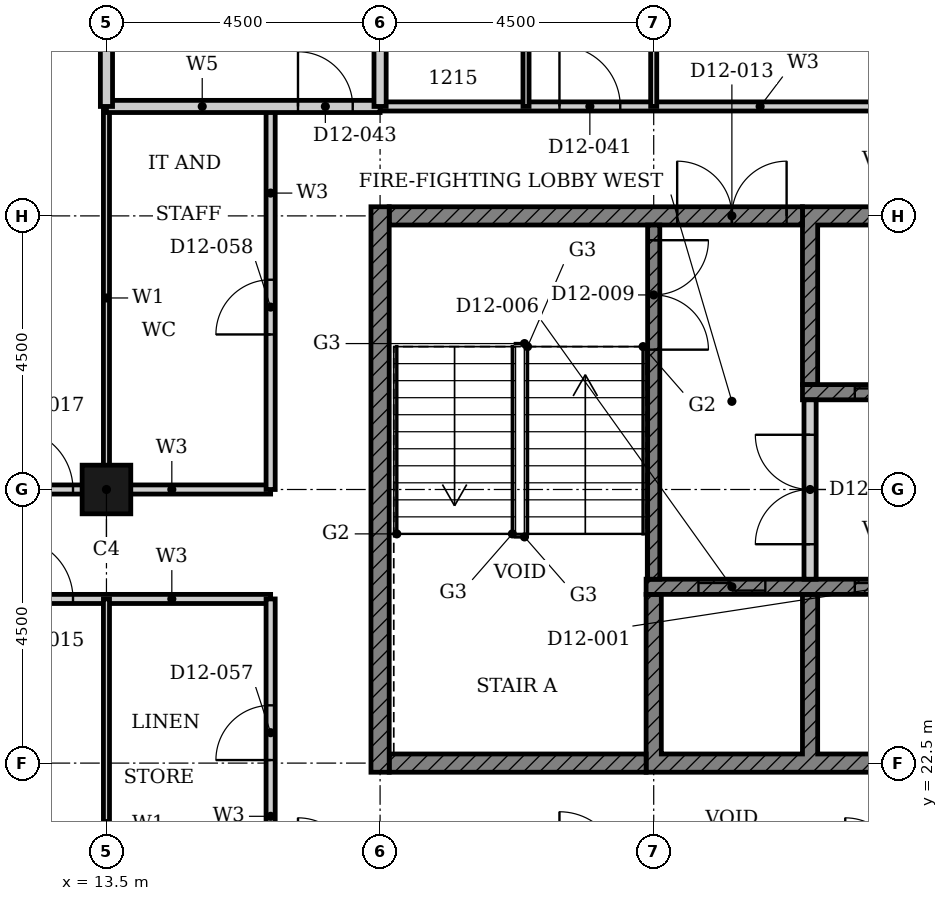
"""IFC4 building model, lengths in metres.
Left out: names, types, materials, properties, quantities, classifications, styles, units other than length and angle.
Written with IfcOpenShell. Run it as: python <this file> out.ifc"""

import sys

from ifc_helpers import new_model, si_unit, direction, frame, frame_2d, origin, origin_2d, place, context, subcontext, project, spatial, polyline, rectangle, hollow_rectangle, outline, extrude, element, fill, save


model = new_model("IFC4")
c1 = context("Model", 3, precision=1e-05, world=origin(), true_north=direction((0.0, 1.0)))
c2 = subcontext(c1, "Body", "Model", "MODEL_VIEW")
j1 = project(units=[si_unit("LENGTHUNIT", "METRE"), si_unit("PLANEANGLEUNIT", "RADIAN")], contexts=[c1])
p1 = place(None, origin())
s1 = spatial("IfcSite", under=j1, at=p1, CompositionType="ELEMENT")
p2 = place(p1, origin())
s2 = spatial("IfcBuilding", under=s1, at=p2, CompositionType="ELEMENT")
p3 = place(p2, frame((0.0, 0.0, 56.4)))
s3 = spatial("IfcBuildingStorey", under=s2, at=p3, CompositionType="ELEMENT", Elevation=56.4)
p4 = place(p3, frame((13.5, 27.0, 0.0), z_axis=(0.0, 0.0, 1.0), x_axis=(1.0, 0.0, 0.0)))
e1 = element("IfcColumn", 1, at=p4, inside=s3, PredefinedType="COLUMN", context=c2, shape_type="SweptSolid", body=[
    extrude(hollow_rectangle(XDim=0.8, YDim=0.8, WallThickness=0.025, at=origin_2d()), origin(), (0.0, 0.0, 1.0), 3.6),
])
p5 = place(p3, origin())
e2 = element("IfcWall", 2, at=p5, inside=s3, PredefinedType="SHEAR", context=c2, shape_type="SweptSolid", body=[
    extrude(outline(polyline([(22.375, 22.35), (38.053, 22.35), (38.053, 25.275), (37.803, 25.275), (37.803, 22.65), (35.482, 22.65), (35.482, 25.275), (35.232, 25.275), (35.232, 22.65), (32.911, 22.65), (32.911, 25.275), (32.661, 25.275), (32.661, 22.65), (30.339, 22.65), (30.339, 25.275), (30.089, 25.275), (30.089, 22.65), (27.768, 22.65), (27.768, 25.275), (27.518, 25.275), (27.518, 22.65), (25.197, 22.65), (25.197, 25.275), (24.947, 25.275), (24.947, 22.65), (22.625, 22.65), (22.625, 25.275), (22.375, 25.275), (22.375, 22.35)])), origin(), (0.0, 0.0, 1.0), 3.3),
])
p6 = place(p3, origin())
e3 = element("IfcWall", 3, at=p6, inside=s3, PredefinedType="SHEAR", context=c2, shape_type="SweptSolid", body=[
    extrude(outline(polyline([(24.947, 28.725), (25.197, 28.725), (25.197, 31.35), (27.518, 31.35), (27.518, 28.725), (27.768, 28.725), (27.768, 31.35), (30.089, 31.35), (30.089, 28.725), (30.339, 28.725), (30.339, 31.35), (32.661, 31.35), (32.661, 28.725), (32.911, 28.725), (32.911, 31.35), (35.232, 31.35), (35.232, 28.725), (35.482, 28.725), (35.482, 31.35), (37.803, 31.35), (37.803, 28.725), (38.053, 28.725), (38.053, 31.35), (40.375, 31.35), (40.375, 28.725), (40.625, 28.725), (40.625, 31.65), (24.947, 31.65), (24.947, 28.725)])), origin(), (0.0, 0.0, 1.0), 3.3),
])
p7 = place(p3, frame((18.15, 22.5, 0.0), z_axis=(0.0, 0.0, 1.0), x_axis=(1.0, 0.0, 0.0)))
e4 = element("IfcWall", 4, at=p7, inside=s3, PredefinedType="SHEAR", context=c2, shape_type="SweptSolid", body=[
    extrude(rectangle(XDim=4.225, YDim=0.3, at=frame_2d((2.113, 0.0))), origin(), (0.0, 0.0, 1.0), 3.3),
])
p8 = place(p3, frame((18.15, 31.5, 0.0), z_axis=(0.0, 0.0, 1.0), x_axis=(1.0, 0.0, 0.0)))
e5 = element("IfcWall", 5, at=p8, inside=s3, PredefinedType="SHEAR", context=c2, shape_type="SweptSolid", body=[
    extrude(rectangle(XDim=6.797, YDim=0.3, at=frame_2d((3.398, 0.0))), origin(), (0.0, 0.0, 1.0), 3.3),
])
p9 = place(p8, frame((4.736, 0.0, 0.0)))
e6 = element("IfcOpeningElement", 6, at=p9, cuts=e5, PredefinedType="OPENING", context=c2, shape_type="SweptSolid", body=[
    extrude(rectangle(XDim=1.8, YDim=2.1, at=frame_2d((0.9, 1.05))), frame((0.0, 0.16, 0.0), z_axis=(0.0, -1.0, 0.0), x_axis=(1.0, 0.0, 0.0)), (0.0, 0.0, 1.0), 0.32),
])
p10 = place(p3, frame((18.0, 22.35, 0.0), z_axis=(0.0, 0.0, 1.0), x_axis=(0.0, 1.0, 0.0)))
e7 = element("IfcWall", 7, at=p10, inside=s3, PredefinedType="SHEAR", context=c2, shape_type="SweptSolid", body=[
    extrude(rectangle(XDim=9.3, YDim=0.3, at=frame_2d((4.65, 0.0))), origin(), (0.0, 0.0, 1.0), 3.3),
])
p11 = place(p3, frame((22.375, 25.4, 0.0), z_axis=(0.0, 0.0, 1.0), x_axis=(1.0, 0.0, 0.0)))
e8 = element("IfcWall", 8, at=p11, inside=s3, PredefinedType="SHEAR", context=c2, shape_type="SweptSolid", body=[
    extrude(rectangle(XDim=15.678, YDim=0.25, at=frame_2d((7.839, 0.0))), origin(), (0.0, 0.0, 1.0), 3.3),
])
p12 = place(p11, frame((3.432, 0.0, 0.0)))
e9 = element("IfcOpeningElement", 9, at=p12, cuts=e8, PredefinedType="OPENING", context=c2, shape_type="SweptSolid", body=[
    extrude(rectangle(XDim=1.1, YDim=2.1, at=frame_2d((0.55, 1.05))), frame((0.0, 0.135, 0.0), z_axis=(0.0, -1.0, 0.0), x_axis=(1.0, 0.0, 0.0)), (0.0, 0.0, 1.0), 0.27),
])
p13 = place(p11, frame((11.146, 0.0, 0.0)))
e10 = element("IfcOpeningElement", 10, at=p13, cuts=e8, PredefinedType="OPENING", context=c2, shape_type="SweptSolid", body=[
    extrude(rectangle(XDim=1.1, YDim=2.1, at=frame_2d((0.55, 1.05))), frame((0.0, 0.135, 0.0), z_axis=(0.0, -1.0, 0.0), x_axis=(1.0, 0.0, 0.0)), (0.0, 0.0, 1.0), 0.27),
])
p14 = place(p11, frame((13.718, 0.0, 0.0)))
e11 = element("IfcOpeningElement", 11, at=p14, cuts=e8, PredefinedType="OPENING", context=c2, shape_type="SweptSolid", body=[
    extrude(rectangle(XDim=1.1, YDim=2.1, at=frame_2d((0.55, 1.05))), frame((0.0, 0.135, 0.0), z_axis=(0.0, -1.0, 0.0), x_axis=(1.0, 0.0, 0.0)), (0.0, 0.0, 1.0), 0.27),
])
p15 = place(p11, frame((0.861, 0.0, 0.0)))
e12 = element("IfcOpeningElement", 12, at=p15, cuts=e8, PredefinedType="OPENING", context=c2, shape_type="SweptSolid", body=[
    extrude(rectangle(XDim=1.1, YDim=2.1, at=frame_2d((0.55, 1.05))), frame((0.0, 0.135, 0.0), z_axis=(0.0, -1.0, 0.0), x_axis=(1.0, 0.0, 0.0)), (0.0, 0.0, 1.0), 0.27),
])
p16 = place(p3, frame((24.947, 28.6, 0.0), z_axis=(0.0, 0.0, 1.0), x_axis=(1.0, 0.0, 0.0)))
e13 = element("IfcWall", 13, at=p16, inside=s3, PredefinedType="SHEAR", context=c2, shape_type="SweptSolid", body=[
    extrude(rectangle(XDim=15.678, YDim=0.25, at=frame_2d((7.839, 0.0))), origin(), (0.0, 0.0, 1.0), 3.3),
])
p17 = place(p16, frame((0.861, 0.0, 0.0)))
e14 = element("IfcOpeningElement", 14, at=p17, cuts=e13, PredefinedType="OPENING", context=c2, shape_type="SweptSolid", body=[
    extrude(rectangle(XDim=1.1, YDim=2.1, at=frame_2d((0.55, 1.05))), frame((0.0, 0.135, 0.0), z_axis=(0.0, -1.0, 0.0), x_axis=(1.0, 0.0, 0.0)), (0.0, 0.0, 1.0), 0.27),
])
p18 = place(p16, frame((8.575, 0.0, 0.0)))
e15 = element("IfcOpeningElement", 15, at=p18, cuts=e13, PredefinedType="OPENING", context=c2, shape_type="SweptSolid", body=[
    extrude(rectangle(XDim=1.1, YDim=2.1, at=frame_2d((0.55, 1.05))), frame((0.0, 0.135, 0.0), z_axis=(0.0, -1.0, 0.0), x_axis=(1.0, 0.0, 0.0)), (0.0, 0.0, 1.0), 0.27),
])
p19 = place(p16, frame((13.718, 0.0, 0.0)))
e16 = element("IfcOpeningElement", 16, at=p19, cuts=e13, PredefinedType="OPENING", context=c2, shape_type="SweptSolid", body=[
    extrude(rectangle(XDim=1.1, YDim=2.1, at=frame_2d((0.55, 1.05))), frame((0.0, 0.135, 0.0), z_axis=(0.0, -1.0, 0.0), x_axis=(1.0, 0.0, 0.0)), (0.0, 0.0, 1.0), 0.27),
])
p20 = place(p3, frame((22.5, 31.35, 0.0), z_axis=(0.0, 0.0, 1.0), x_axis=(0.0, -1.0, 0.0)))
e17 = element("IfcWall", 17, at=p20, inside=s3, PredefinedType="SHEAR", context=c2, shape_type="SweptSolid", body=[
    extrude(rectangle(XDim=5.825, YDim=0.2, at=frame_2d((2.913, 0.0))), origin(), (0.0, 0.0, 1.0), 3.3),
])
p21 = place(p20, frame((0.25, 0.0, 0.0)))
e18 = element("IfcOpeningElement", 18, at=p21, cuts=e17, PredefinedType="OPENING", context=c2, shape_type="SweptSolid", body=[
    extrude(rectangle(XDim=1.8, YDim=2.1, at=frame_2d((0.9, 1.05))), frame((0.0, 0.11, 0.0), z_axis=(0.0, -1.0, 0.0), x_axis=(1.0, 0.0, 0.0)), (0.0, 0.0, 1.0), 0.22),
])
p22 = place(p3, frame((25.072, 25.525, 0.0), z_axis=(0.0, 0.0, 1.0), x_axis=(0.0, 1.0, 0.0)))
e19 = element("IfcWall", 19, at=p22, inside=s3, PredefinedType="PARTITIONING", context=c2, shape_type="SweptSolid", body=[
    extrude(rectangle(XDim=2.95, YDim=0.2, at=frame_2d((1.475, 0.0))), origin(), (0.0, 0.0, 1.0), 3.3),
])
p23 = place(p22, frame((0.575, 0.0, 0.0)))
e20 = element("IfcOpeningElement", 20, at=p23, cuts=e19, PredefinedType="OPENING", context=c2, shape_type="SweptSolid", body=[
    extrude(rectangle(XDim=1.8, YDim=2.1, at=frame_2d((0.9, 1.05))), frame((0.0, 0.11, 0.0), z_axis=(0.0, -1.0, 0.0), x_axis=(1.0, 0.0, 0.0)), (0.0, 0.0, 1.0), 0.22),
])
p24 = place(p3, frame((9.0, 25.2, 0.0), z_axis=(0.0, 0.0, 1.0), x_axis=(1.0, 0.0, 0.0)))
e21 = element("IfcWall", 21, at=p24, inside=s3, PredefinedType="PARTITIONING", context=c2, shape_type="SweptSolid", body=[
    extrude(rectangle(XDim=7.2, YDim=0.15, at=frame_2d((3.6, 0.0))), origin(), (0.0, 0.0, 1.0), 3.3),
])
p25 = place(p24, frame((2.95, 0.0, 0.0)))
e22 = element("IfcOpeningElement", 22, at=p25, cuts=e21, PredefinedType="OPENING", context=c2, shape_type="SweptSolid", body=[
    extrude(rectangle(XDim=1.0, YDim=2.1, at=frame_2d((0.5, 1.05))), frame((0.0, 0.085, 0.0), z_axis=(0.0, -1.0, 0.0), x_axis=(1.0, 0.0, 0.0)), (0.0, 0.0, 1.0), 0.17),
])
p26 = place(p3, frame((9.0, 27.0, 0.0), z_axis=(0.0, 0.0, 1.0), x_axis=(1.0, 0.0, 0.0)))
e23 = element("IfcWall", 23, at=p26, inside=s3, PredefinedType="PARTITIONING", context=c2, shape_type="SweptSolid", body=[
    extrude(rectangle(XDim=7.2, YDim=0.15, at=frame_2d((3.6, 0.0))), origin(), (0.0, 0.0, 1.0), 2.58),
])
p27 = place(p26, frame((2.95, 0.0, 0.0)))
e24 = element("IfcOpeningElement", 24, at=p27, cuts=e23, PredefinedType="OPENING", context=c2, shape_type="SweptSolid", body=[
    extrude(rectangle(XDim=1.0, YDim=2.1, at=frame_2d((0.5, 1.05))), frame((0.0, 0.085, 0.0), z_axis=(0.0, -1.0, 0.0), x_axis=(1.0, 0.0, 0.0)), (0.0, 0.0, 1.0), 0.17),
])
p28 = place(p3, frame((18.0, 33.3, 0.0), z_axis=(0.0, 0.0, 1.0), x_axis=(1.0, 0.0, 0.0)))
e25 = element("IfcWall", 25, at=p28, inside=s3, PredefinedType="PARTITIONING", context=c2, shape_type="SweptSolid", body=[
    extrude(rectangle(XDim=13.5, YDim=0.15, at=frame_2d((6.75, 0.0))), origin(), (0.0, 0.0, 1.0), 3.3),
])
p29 = place(p28, frame((2.95, 0.0, 0.0)))
e26 = element("IfcOpeningElement", 26, at=p29, cuts=e25, PredefinedType="OPENING", context=c2, shape_type="SweptSolid", body=[
    extrude(rectangle(XDim=1.0, YDim=2.1, at=frame_2d((0.5, 1.05))), frame((0.0, 0.085, 0.0), z_axis=(0.0, -1.0, 0.0), x_axis=(1.0, 0.0, 0.0)), (0.0, 0.0, 1.0), 0.17),
])
p30 = place(p28, frame((8.55, 0.0, 0.0)))
e27 = element("IfcOpeningElement", 27, at=p30, cuts=e25, PredefinedType="OPENING", context=c2, shape_type="SweptSolid", body=[
    extrude(rectangle(XDim=0.9, YDim=2.1, at=frame_2d((0.45, 1.05))), frame((0.0, 0.085, 0.0), z_axis=(0.0, -1.0, 0.0), x_axis=(1.0, 0.0, 0.0)), (0.0, 0.0, 1.0), 0.17),
])
p31 = place(p3, frame((16.2, 27.0, 0.0), z_axis=(0.0, 0.0, 1.0), x_axis=(0.0, 1.0, 0.0)))
e28 = element("IfcWall", 28, at=p31, inside=s3, PredefinedType="PARTITIONING", context=c2, shape_type="SweptSolid", body=[
    extrude(rectangle(XDim=6.3, YDim=0.15, at=frame_2d((3.15, 0.0))), origin(), (0.0, 0.0, 1.0), 3.3),
])
p32 = place(p31, frame((2.55, 0.0, 0.0)))
e29 = element("IfcOpeningElement", 29, at=p32, cuts=e28, PredefinedType="OPENING", context=c2, shape_type="SweptSolid", body=[
    extrude(rectangle(XDim=0.9, YDim=2.1, at=frame_2d((0.45, 1.05))), frame((0.0, 0.085, 0.0), z_axis=(0.0, -1.0, 0.0), x_axis=(1.0, 0.0, 0.0)), (0.0, 0.0, 1.0), 0.17),
])
p33 = place(p3, frame((16.2, 20.7, 0.0), z_axis=(0.0, 0.0, 1.0), x_axis=(0.0, 1.0, 0.0)))
e30 = element("IfcWall", 30, at=p33, inside=s3, PredefinedType="PARTITIONING", context=c2, shape_type="SweptSolid", body=[
    extrude(rectangle(XDim=4.5, YDim=0.15, at=frame_2d((2.25, 0.0))), origin(), (0.0, 0.0, 1.0), 3.3),
])
p34 = place(p33, frame((1.85, 0.0, 0.0)))
e31 = element("IfcOpeningElement", 31, at=p34, cuts=e30, PredefinedType="OPENING", context=c2, shape_type="SweptSolid", body=[
    extrude(rectangle(XDim=0.9, YDim=2.1, at=frame_2d((0.45, 1.05))), frame((0.0, 0.085, 0.0), z_axis=(0.0, -1.0, 0.0), x_axis=(1.0, 0.0, 0.0)), (0.0, 0.0, 1.0), 0.17),
])
p35 = place(p3, frame((13.5, 27.0, 0.0), z_axis=(0.0, 0.0, 1.0), x_axis=(0.0, 1.0, 0.0)))
e32 = element("IfcWall", 32, at=p35, inside=s3, PredefinedType="PARTITIONING", context=c2, shape_type="SweptSolid", body=[
    extrude(rectangle(XDim=6.3, YDim=0.1, at=frame_2d((3.15, 0.0))), origin(), (0.0, 0.0, 1.0), 2.38),
])
p36 = place(p3, frame((13.5, 17.81, 0.0), z_axis=(0.0, 0.0, 1.0), x_axis=(0.0, 1.0, 0.0)))
e33 = element("IfcWall", 33, at=p36, inside=s3, PredefinedType="PARTITIONING", context=c2, shape_type="SweptSolid", body=[
    extrude(rectangle(XDim=7.39, YDim=0.1, at=frame_2d((3.695, 0.0))), origin(), (0.0, 0.0, 1.0), 2.38),
])
p37 = place(p3, frame((22.5, 33.3, 0.0), z_axis=(0.0, 0.0, 1.0), x_axis=(0.0, 1.0, 0.0)))
e34 = element("IfcWall", 34, at=p37, inside=s3, PredefinedType="PARTITIONING", context=c2, shape_type="SweptSolid", body=[
    extrude(rectangle(XDim=7.39, YDim=0.1, at=frame_2d((3.695, 0.0))), origin(), (0.0, 0.0, 1.0), 3.3),
])
p38 = place(p3, frame((20.4, 33.3, 0.0), z_axis=(0.0, 0.0, 1.0), x_axis=(0.0, 1.0, 0.0)))
e35 = element("IfcWall", 35, at=p38, inside=s3, PredefinedType="PARTITIONING", context=c2, shape_type="SweptSolid", body=[
    extrude(rectangle(XDim=2.7, YDim=0.1, at=frame_2d((1.35, 0.0))), origin(), (0.0, 0.0, 1.0), 3.3),
])
p39 = place(p3, frame((13.5, 33.3, 0.0), z_axis=(0.0, 0.0, 1.0), x_axis=(1.0, 0.0, 0.0)))
e36 = element("IfcWall", 36, at=p39, inside=s3, PredefinedType="PARTITIONING", context=c2, shape_type="SweptSolid", body=[
    extrude(rectangle(XDim=4.5, YDim=0.2, at=frame_2d((2.25, 0.0))), origin(), (0.0, 0.0, 1.0), 3.3),
])
p40 = place(p39, frame((3.15, 0.0, 0.0)))
e37 = element("IfcOpeningElement", 37, at=p40, cuts=e36, PredefinedType="OPENING", context=c2, shape_type="SweptSolid", body=[
    extrude(rectangle(XDim=0.9, YDim=2.1, at=frame_2d((0.45, 1.05))), frame((0.0, 0.11, 0.0), z_axis=(0.0, -1.0, 0.0), x_axis=(1.0, 0.0, 0.0)), (0.0, 0.0, 1.0), 0.22),
])
p41 = place(p3, frame((13.5, 33.3, 0.0), z_axis=(0.0, 0.0, 1.0), x_axis=(0.0, 1.0, 0.0)))
e38 = element("IfcWall", 38, at=p41, inside=s3, PredefinedType="PARTITIONING", context=c2, shape_type="SweptSolid", body=[
    extrude(rectangle(XDim=2.89, YDim=0.2, at=frame_2d((1.445, 0.0))), origin(), (0.0, 0.0, 1.0), 2.38),
])
p42 = place(p3, frame((18.0, 33.3, 0.0), z_axis=(0.0, 0.0, 1.0), x_axis=(0.0, 1.0, 0.0)))
e39 = element("IfcWall", 39, at=p42, inside=s3, PredefinedType="PARTITIONING", context=c2, shape_type="SweptSolid", body=[
    extrude(rectangle(XDim=5.14, YDim=0.2, at=frame_2d((2.57, 0.0))), origin(), (0.0, 0.0, 1.0), 3.3),
])
p43 = place(p12, origin())
e40 = element("IfcDoor", 40, at=p43, inside=s3, OperationType="DOUBLE_DOOR_SLIDING", PredefinedType="DOOR", context=c2, shape_type="SweptSolid", body=[
    extrude(rectangle(XDim=1.1, YDim=2.1, at=frame_2d((0.55, 1.05))), frame((0.0, 0.025, 0.0), z_axis=(0.0, -1.0, 0.0), x_axis=(1.0, 0.0, 0.0)), (0.0, 0.0, 1.0), 0.05),
])
fill(e9, e40)
p44 = place(p17, origin())
e41 = element("IfcDoor", 41, at=p44, inside=s3, OperationType="DOUBLE_DOOR_SLIDING", PredefinedType="DOOR", context=c2, shape_type="SweptSolid", body=[
    extrude(rectangle(XDim=1.1, YDim=2.1, at=frame_2d((0.55, 1.05))), frame((0.0, 0.025, 0.0), z_axis=(0.0, -1.0, 0.0), x_axis=(1.0, 0.0, 0.0)), (0.0, 0.0, 1.0), 0.05),
])
fill(e14, e41)
p45 = place(p15, origin())
e42 = element("IfcDoor", 42, at=p45, inside=s3, OperationType="DOUBLE_DOOR_SLIDING", PredefinedType="DOOR", context=c2, shape_type="SweptSolid", body=[
    extrude(rectangle(XDim=1.1, YDim=2.1, at=frame_2d((0.55, 1.05))), frame((0.0, 0.025, 0.0), z_axis=(0.0, -1.0, 0.0), x_axis=(1.0, 0.0, 0.0)), (0.0, 0.0, 1.0), 0.05),
])
fill(e12, e42)
p46 = place(p21, origin())
e43 = element("IfcDoor", 43, at=p46, inside=s3, OperationType="DOUBLE_DOOR_SINGLE_SWING", PredefinedType="DOOR", context=c2, shape_type="SweptSolid", body=[
    extrude(rectangle(XDim=1.8, YDim=2.1, at=frame_2d((0.9, 1.05))), frame((0.0, 0.025, 0.0), z_axis=(0.0, -1.0, 0.0), x_axis=(1.0, 0.0, 0.0)), (0.0, 0.0, 1.0), 0.05),
])
fill(e18, e43)
p47 = place(p23, origin())
e44 = element("IfcDoor", 44, at=p47, inside=s3, OperationType="DOUBLE_DOOR_SINGLE_SWING", PredefinedType="DOOR", context=c2, shape_type="SweptSolid", body=[
    extrude(rectangle(XDim=1.8, YDim=2.1, at=frame_2d((0.9, 1.05))), frame((0.0, 0.025, 0.0), z_axis=(0.0, -1.0, 0.0), x_axis=(1.0, 0.0, 0.0)), (0.0, 0.0, 1.0), 0.05),
])
fill(e20, e44)
p48 = place(p9, origin())
e45 = element("IfcDoor", 45, at=p48, inside=s3, OperationType="DOUBLE_DOOR_SINGLE_SWING", PredefinedType="DOOR", context=c2, shape_type="SweptSolid", body=[
    extrude(rectangle(XDim=1.8, YDim=2.1, at=frame_2d((0.9, 1.05))), frame((0.0, 0.025, 0.0), z_axis=(0.0, -1.0, 0.0), x_axis=(1.0, 0.0, 0.0)), (0.0, 0.0, 1.0), 0.05),
])
fill(e6, e45)
p49 = place(p25, origin())
e46 = element("IfcDoor", 46, at=p49, inside=s3, OperationType="SINGLE_SWING_RIGHT", PredefinedType="DOOR", context=c2, shape_type="SweptSolid", body=[
    extrude(rectangle(XDim=1.0, YDim=2.1, at=frame_2d((0.5, 1.05))), frame((0.0, 0.025, 0.0), z_axis=(0.0, -1.0, 0.0), x_axis=(1.0, 0.0, 0.0)), (0.0, 0.0, 1.0), 0.05),
])
fill(e22, e46)
p50 = place(p27, origin())
e47 = element("IfcDoor", 47, at=p50, inside=s3, OperationType="SINGLE_SWING_RIGHT", PredefinedType="DOOR", context=c2, shape_type="SweptSolid", body=[
    extrude(rectangle(XDim=1.0, YDim=2.1, at=frame_2d((0.5, 1.05))), frame((0.0, 0.025, 0.0), z_axis=(0.0, -1.0, 0.0), x_axis=(1.0, 0.0, 0.0)), (0.0, 0.0, 1.0), 0.05),
])
fill(e24, e47)
p51 = place(p29, origin())
e48 = element("IfcDoor", 48, at=p51, inside=s3, OperationType="SINGLE_SWING_RIGHT", PredefinedType="DOOR", context=c2, shape_type="SweptSolid", body=[
    extrude(rectangle(XDim=1.0, YDim=2.1, at=frame_2d((0.5, 1.05))), frame((0.0, 0.025, 0.0), z_axis=(0.0, -1.0, 0.0), x_axis=(1.0, 0.0, 0.0)), (0.0, 0.0, 1.0), 0.05),
])
fill(e26, e48)
p52 = place(p40, origin())
e49 = element("IfcDoor", 49, at=p52, inside=s3, OperationType="SINGLE_SWING_LEFT", PredefinedType="DOOR", context=c2, shape_type="SweptSolid", body=[
    extrude(rectangle(XDim=0.9, YDim=2.1, at=frame_2d((0.45, 1.05))), frame((0.0, 0.025, 0.0), z_axis=(0.0, -1.0, 0.0), x_axis=(1.0, 0.0, 0.0)), (0.0, 0.0, 1.0), 0.05),
])
fill(e37, e49)
p53 = place(p34, origin())
e50 = element("IfcDoor", 50, at=p53, inside=s3, OperationType="SINGLE_SWING_LEFT", PredefinedType="DOOR", context=c2, shape_type="SweptSolid", body=[
    extrude(rectangle(XDim=0.9, YDim=2.1, at=frame_2d((0.45, 1.05))), frame((0.0, 0.025, 0.0), z_axis=(0.0, -1.0, 0.0), x_axis=(1.0, 0.0, 0.0)), (0.0, 0.0, 1.0), 0.05),
])
fill(e31, e50)
p54 = place(p32, origin())
e51 = element("IfcDoor", 51, at=p54, inside=s3, OperationType="SINGLE_SWING_LEFT", PredefinedType="DOOR", context=c2, shape_type="SweptSolid", body=[
    extrude(rectangle(XDim=0.9, YDim=2.1, at=frame_2d((0.45, 1.05))), frame((0.0, 0.025, 0.0), z_axis=(0.0, -1.0, 0.0), x_axis=(1.0, 0.0, 0.0)), (0.0, 0.0, 1.0), 0.05),
])
fill(e29, e51)
save(model, sys.argv[1])
